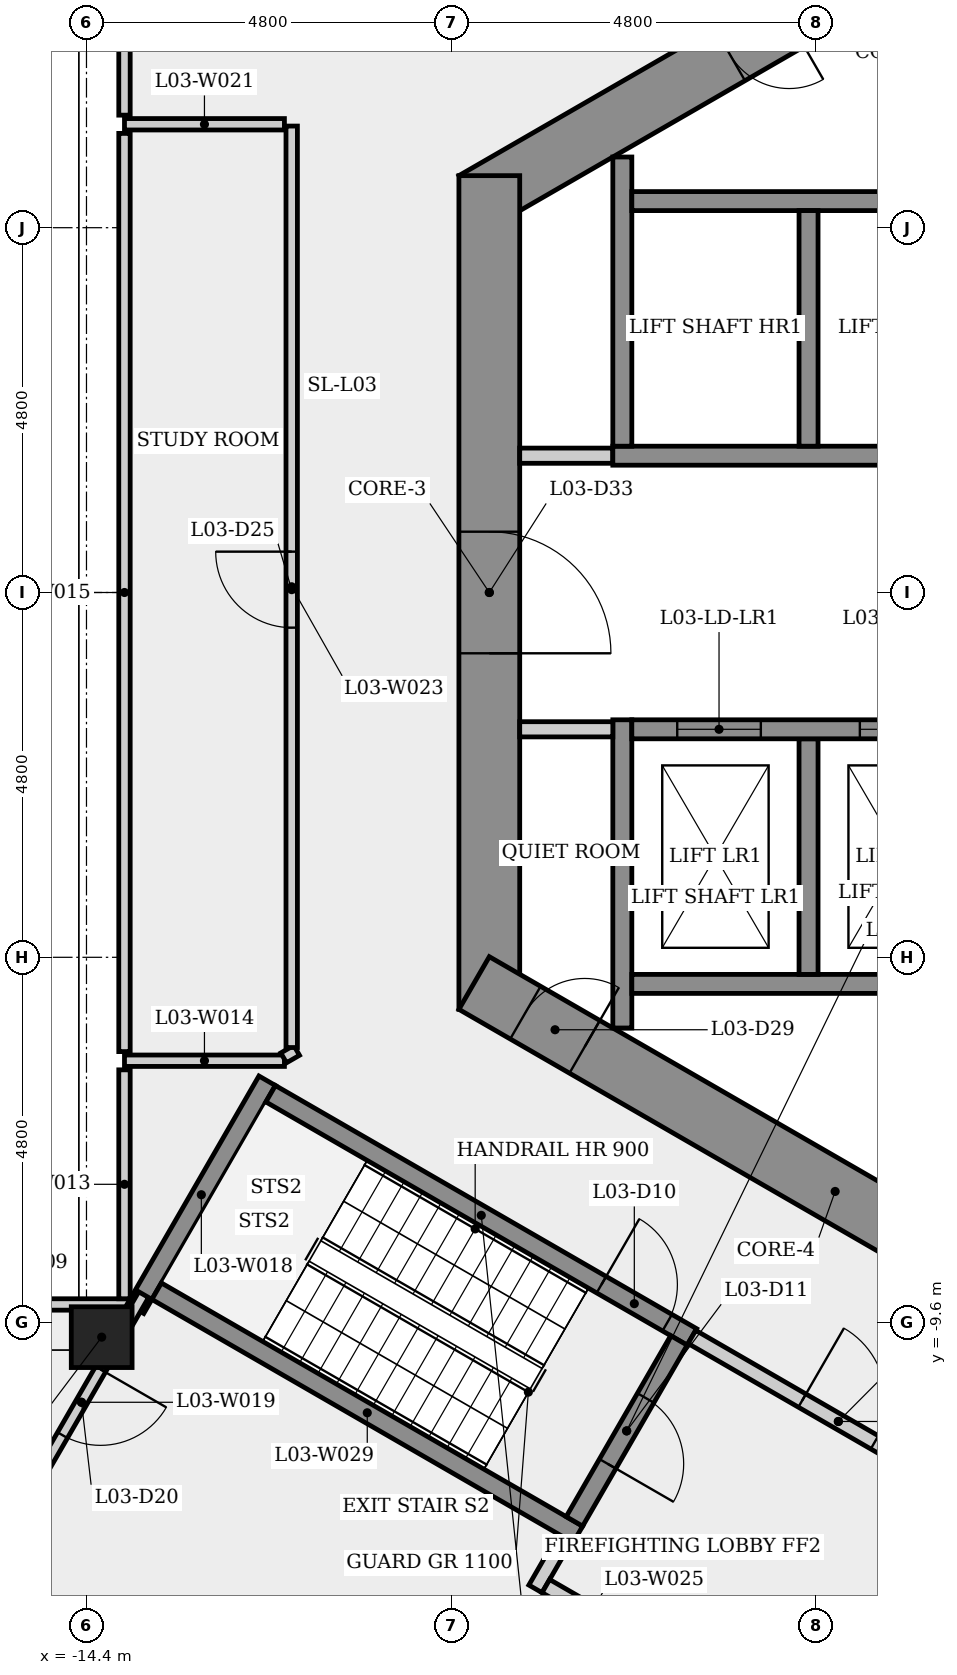
"""IFC4 building model, lengths in metres.
Left out: names, types, materials, properties, quantities, classifications, styles, units other than length and angle.
Written with IfcOpenShell. Run it as: python <this file> out.ifc"""

import sys

from ifc_helpers import new_model, si_unit, direction, frame, frame_2d, origin, origin_2d, place, context, subcontext, project, spatial, rectangle, extrude, element, fill, save


model = new_model("IFC4")
c1 = context("Model", 3, precision=1e-05, world=origin(), true_north=direction((0.0, 1.0)))
c2 = subcontext(c1, "Body", "Model", "MODEL_VIEW")
j1 = project(units=[si_unit("LENGTHUNIT", "METRE"), si_unit("PLANEANGLEUNIT", "RADIAN")], contexts=[c1])
p1 = place(None, origin())
s1 = spatial("IfcSite", under=j1, at=p1, CompositionType="ELEMENT")
p2 = place(p1, origin())
s2 = spatial("IfcBuilding", under=s1, at=p2, CompositionType="ELEMENT")
p3 = place(p2, frame((0.0, 0.0, 16.0)))
s3 = spatial("IfcBuildingStorey", under=s2, at=p3, CompositionType="ELEMENT", Elevation=16.0)
p4 = place(p3, frame((0.2, 10.623, 0.0), z_axis=(0.0, 0.0, 1.0), x_axis=(-0.866023993627, -0.500002442456, 0.0)))
e1 = element("IfcWall", 1, at=p4, inside=s3, PredefinedType="SHEAR", context=c2, shape_type="SweptSolid", body=[
    extrude(rectangle(XDim=10.97, YDim=0.8, at=frame_2d((5.485, 0.0))), origin(), (0.0, 0.0, 1.0), 4.5),
])
p5 = place(p4, frame((6.185, 0.0, 0.0)))
e2 = element("IfcOpeningElement", 2, at=p5, cuts=e1, PredefinedType="OPENING", context=c2, shape_type="SweptSolid", body=[
    extrude(rectangle(XDim=0.9, YDim=2.1, at=frame_2d((0.45, 1.05))), frame((0.0, 0.41, 0.0), z_axis=(0.0, -1.0, 0.0), x_axis=(1.0, 0.0, 0.0)), (0.0, 0.0, 1.0), 0.82),
])
p6 = place(p3, frame((-9.1, 5.485, 0.0), z_axis=(0.0, 0.0, 1.0), x_axis=(0.0, -1.0, 0.0)))
e3 = element("IfcWall", 3, at=p6, inside=s3, PredefinedType="SHEAR", context=c2, shape_type="SweptSolid", body=[
    extrude(rectangle(XDim=10.97, YDim=0.8, at=frame_2d((5.485, 0.0))), origin(), (0.0, 0.0, 1.0), 4.5),
])
p7 = place(p6, frame((4.685, 0.0, 0.0)))
e4 = element("IfcOpeningElement", 4, at=p7, cuts=e3, PredefinedType="OPENING", context=c2, shape_type="SweptSolid", body=[
    extrude(rectangle(XDim=1.6, YDim=2.1, at=frame_2d((0.8, 1.05))), frame((0.0, 0.41, 0.0), z_axis=(0.0, -1.0, 0.0), x_axis=(1.0, 0.0, 0.0)), (0.0, 0.0, 1.0), 0.82),
])
p8 = place(p3, frame((-9.3, -5.138, 0.0), z_axis=(0.0, 0.0, 1.0), x_axis=(0.866023993627, -0.500002442456, 0.0)))
e5 = element("IfcWall", 5, at=p8, inside=s3, PredefinedType="SHEAR", context=c2, shape_type="SweptSolid", body=[
    extrude(rectangle(XDim=10.97, YDim=0.8, at=frame_2d((5.485, 0.0))), origin(), (0.0, 0.0, 1.0), 4.5),
])
p9 = place(p8, frame((0.78, 0.0, 0.0)))
e6 = element("IfcOpeningElement", 6, at=p9, cuts=e5, PredefinedType="OPENING", context=c2, shape_type="SweptSolid", body=[
    extrude(rectangle(XDim=0.9, YDim=2.1, at=frame_2d((0.45, 1.05))), frame((0.0, 0.41, 0.0), z_axis=(0.0, -1.0, 0.0), x_axis=(1.0, 0.0, 0.0)), (0.0, 0.0, 1.0), 0.82),
])
p10 = place(p3, frame((-14.2, -9.798, 0.0), z_axis=(0.0, 0.0, 1.0), x_axis=(-1.0, 0.0, 0.0)))
e7 = element("IfcColumn", 7, at=p10, inside=s3, PredefinedType="COLUMN", context=c2, shape_type="SweptSolid", body=[
    extrude(rectangle(XDim=0.8, YDim=0.8, at=origin_2d()), origin(), (0.0, 0.0, 1.0), 4.05),
])
p11 = place(p3, frame((-16.78, -9.368, 0.0), z_axis=(0.0, 0.0, 1.0), x_axis=(1.0, 0.0, 0.0)))
e8 = element("IfcWall", 8, at=p11, inside=s3, PredefinedType="PARTITIONING", context=c2, shape_type="SweptSolid", body=[
    extrude(rectangle(XDim=2.955, YDim=0.15, at=frame_2d((1.478, 0.0))), origin(), (0.0, 0.0, 1.0), 4.05),
])
p12 = place(p3, frame((-13.9, -9.293, 0.0), z_axis=(0.0, 0.0, 1.0), x_axis=(0.0, 1.0, 0.0)))
e9 = element("IfcWall", 9, at=p12, inside=s3, PredefinedType="PARTITIONING", context=c2, shape_type="SweptSolid", body=[
    extrude(rectangle(XDim=3.012, YDim=0.15, at=frame_2d((1.506, 0.0))), origin(), (0.0, 0.0, 1.0), 4.05),
])
p13 = place(p3, frame((-13.9, -6.161, 0.0), z_axis=(0.0, 0.0, 1.0), x_axis=(1.0, 0.0, 0.0)))
e10 = element("IfcWall", 10, at=p13, inside=s3, PredefinedType="PARTITIONING", context=c2, shape_type="SweptSolid", body=[
    extrude(rectangle(XDim=2.104, YDim=0.15, at=frame_2d((1.052, 0.0))), origin(), (0.0, 0.0, 1.0), 4.05),
])
p14 = place(p3, frame((-13.9, -6.041, 0.0), z_axis=(0.0, 0.0, 1.0), x_axis=(0.0, 1.0, 0.0)))
e11 = element("IfcWall", 11, at=p14, inside=s3, PredefinedType="PARTITIONING", context=c2, shape_type="SweptSolid", body=[
    extrude(rectangle(XDim=12.082, YDim=0.15, at=frame_2d((6.041, 0.0))), origin(), (0.0, 0.0, 1.0), 4.05),
])
p15 = place(p3, frame((-13.9, 6.281, 0.0), z_axis=(0.0, 0.0, 1.0), x_axis=(0.0, 1.0, 0.0)))
e12 = element("IfcWall", 12, at=p15, inside=s3, PredefinedType="PARTITIONING", context=c2, shape_type="SweptSolid", body=[
    extrude(rectangle(XDim=3.162, YDim=0.15, at=frame_2d((1.581, 0.0))), origin(), (0.0, 0.0, 1.0), 4.05),
])
p16 = place(p3, frame((-13.755, -9.424, 0.0), z_axis=(0.0, 0.0, 1.0), x_axis=(0.500005140434, 0.866022435933, 0.0)))
e13 = element("IfcWall", 13, at=p16, inside=s3, PredefinedType="SHEAR", context=c2, shape_type="SweptSolid", body=[
    extrude(rectangle(XDim=3.464, YDim=0.25, at=frame_2d((1.732, 0.0))), origin(), (0.0, 0.0, 1.0), 4.05),
])
p17 = place(p3, frame((-13.648, -9.239, 0.0), z_axis=(0.0, 0.0, 1.0), x_axis=(-0.50004125829, -0.866001581989, 0.0)))
e14 = element("IfcWall", 14, at=p17, inside=s3, PredefinedType="PARTITIONING", context=c2, shape_type="SweptSolid", body=[
    extrude(rectangle(XDim=3.27, YDim=0.15, at=frame_2d((1.635, 0.0))), origin(), (0.0, 0.0, 1.0), 4.05),
])
p18 = place(p17, frame((1.135, 0.0, 0.0)))
e15 = element("IfcOpeningElement", 15, at=p18, cuts=e14, PredefinedType="OPENING", context=c2, shape_type="SweptSolid", body=[
    extrude(rectangle(XDim=1.0, YDim=2.1, at=frame_2d((0.5, 1.05))), frame((0.0, 0.085, 0.0), z_axis=(0.0, -1.0, 0.0), x_axis=(1.0, 0.0, 0.0)), (0.0, 0.0, 1.0), 0.17),
])
p19 = place(p3, frame((-11.977, -6.595, 0.0), z_axis=(0.0, 0.0, 1.0), x_axis=(0.866025499775, -0.499999833739, 0.0)))
e16 = element("IfcWall", 16, at=p19, inside=s3, PredefinedType="SHEAR", context=c2, shape_type="SweptSolid", body=[
    extrude(rectangle(XDim=6.4, YDim=0.25, at=frame_2d((3.2, 0.0))), origin(), (0.0, 0.0, 1.0), 4.05),
])
p20 = place(p19, frame((5.025, 0.0, 0.0)))
e17 = element("IfcOpeningElement", 17, at=p20, cuts=e16, PredefinedType="OPENING", context=c2, shape_type="SweptSolid", body=[
    extrude(rectangle(XDim=1.0, YDim=2.1, at=frame_2d((0.5, 1.05))), frame((0.0, 0.135, 0.0), z_axis=(0.0, -1.0, 0.0), x_axis=(1.0, 0.0, 0.0)), (0.0, 0.0, 1.0), 0.27),
])
p21 = place(p3, frame((-11.796, 6.161, 0.0), z_axis=(0.0, 0.0, 1.0), x_axis=(-1.0, 0.0, 0.0)))
e18 = element("IfcWall", 18, at=p21, inside=s3, PredefinedType="PARTITIONING", context=c2, shape_type="SweptSolid", body=[
    extrude(rectangle(XDim=2.104, YDim=0.15, at=frame_2d((1.052, 0.0))), origin(), (0.0, 0.0, 1.0), 4.05),
])
p22 = place(p3, frame((-11.806, -6.123, 0.0), z_axis=(0.0, 0.0, 1.0), x_axis=(0.866103179807, 0.499865263774, 0.0)))
e19 = element("IfcWall", 19, at=p22, inside=s3, PredefinedType="PARTITIONING", context=c2, shape_type="SweptSolid", body=[
    extrude(rectangle(XDim=0.197, YDim=0.15, at=frame_2d((0.099, 0.0))), origin(), (0.0, 0.0, 1.0), 4.05),
])
p23 = place(p3, frame((-11.7, -5.987, 0.0), z_axis=(0.0, 0.0, 1.0), x_axis=(0.0, 1.0, 0.0)))
e20 = element("IfcWall", 20, at=p23, inside=s3, PredefinedType="PARTITIONING", context=c2, shape_type="SweptSolid", body=[
    extrude(rectangle(XDim=12.125, YDim=0.15, at=frame_2d((6.062, 0.0))), origin(), (0.0, 0.0, 1.0), 4.05),
])
p24 = place(p23, frame((5.525, 0.0, 0.0)))
e21 = element("IfcOpeningElement", 21, at=p24, cuts=e20, PredefinedType="OPENING", context=c2, shape_type="SweptSolid", body=[
    extrude(rectangle(XDim=1.0, YDim=2.1, at=frame_2d((0.5, 1.05))), frame((0.0, 0.085, 0.0), z_axis=(0.0, -1.0, 0.0), x_axis=(1.0, 0.0, 0.0)), (0.0, 0.0, 1.0), 0.17),
])
p25 = place(p3, frame((-8.7, 1.8, 0.0), z_axis=(0.0, 0.0, 1.0), x_axis=(1.0, 0.0, 0.0)))
e22 = element("IfcWall", 22, at=p25, inside=s3, PredefinedType="PARTITIONING", context=c2, shape_type="SweptSolid", body=[
    extrude(rectangle(XDim=1.225, YDim=0.2, at=frame_2d((0.613, 0.0))), origin(), (0.0, 0.0, 1.0), 4.05),
])
p26 = place(p3, frame((-8.493, -13.11, 0.0), z_axis=(0.0, 0.0, 1.0), x_axis=(0.500067724834, 0.865986299303, 0.0)))
e23 = element("IfcWall", 23, at=p26, inside=s3, PredefinedType="PARTITIONING", context=c2, shape_type="SweptSolid", body=[
    extrude(rectangle(XDim=0.775, YDim=0.2, at=frame_2d((0.388, 0.0))), origin(), (0.0, 0.0, 1.0), 4.05),
])
p27 = place(p3, frame((-7.935, -12.393, 0.0), z_axis=(0.0, 0.0, 1.0), x_axis=(-0.866025499775, 0.499999833739, 0.0)))
e24 = element("IfcWall", 24, at=p27, inside=s3, PredefinedType="SHEAR", context=c2, shape_type="SweptSolid", body=[
    extrude(rectangle(XDim=6.4, YDim=0.25, at=frame_2d((3.2, 0.0))), origin(), (0.0, 0.0, 1.0), 4.05),
])
p28 = place(p3, frame((-7.836, -13.373, 0.0), z_axis=(0.0, 0.0, 1.0), x_axis=(-0.866232998003, 0.499640263761, 0.0)))
e25 = element("IfcWall", 25, at=p28, inside=s3, PredefinedType="PARTITIONING", context=c2, shape_type="SweptSolid", body=[
    extrude(rectangle(XDim=0.6, YDim=0.2, at=frame_2d((0.3, 0.0))), origin(), (0.0, 0.0, 1.0), 4.05),
])
p29 = place(p3, frame((-7.475, 1.8, 0.0), z_axis=(0.0, 0.0, 1.0), x_axis=(1.0, 0.0, 0.0)))
e26 = element("IfcWall", 26, at=p29, inside=s3, PredefinedType="SHEAR", context=c2, shape_type="SweptSolid", body=[
    extrude(rectangle(XDim=14.95, YDim=0.25, at=frame_2d((7.475, 0.0))), origin(), (0.0, 0.0, 1.0), 4.05),
])
p30 = place(p3, frame((-7.35, -5.73, 0.0), z_axis=(0.0, 0.0, 1.0), x_axis=(0.0, 1.0, 0.0)))
e27 = element("IfcWall", 27, at=p30, inside=s3, PredefinedType="SHEAR", context=c2, shape_type="SweptSolid", body=[
    extrude(rectangle(XDim=4.055, YDim=0.25, at=frame_2d((2.028, 0.0))), origin(), (0.0, 0.0, 1.0), 4.05),
])
p31 = place(p3, frame((-7.35, 1.925, 0.0), z_axis=(0.0, 0.0, 1.0), x_axis=(0.0, 1.0, 0.0)))
e28 = element("IfcWall", 28, at=p31, inside=s3, PredefinedType="SHEAR", context=c2, shape_type="SweptSolid", body=[
    extrude(rectangle(XDim=3.805, YDim=0.25, at=frame_2d((1.903, 0.0))), origin(), (0.0, 0.0, 1.0), 4.05),
])
p32 = place(p3, frame((-7.225, 5.15, 0.0), z_axis=(0.0, 0.0, 1.0), x_axis=(1.0, 0.0, 0.0)))
e29 = element("IfcWall", 29, at=p32, inside=s3, PredefinedType="SHEAR", context=c2, shape_type="SweptSolid", body=[
    extrude(rectangle(XDim=14.7, YDim=0.25, at=frame_2d((7.35, 0.0))), origin(), (0.0, 0.0, 1.0), 4.05),
])
p33 = place(p3, frame((-7.475, -1.8, 0.0), z_axis=(0.0, 0.0, 1.0), x_axis=(-1.0, 0.0, 0.0)))
e30 = element("IfcWall", 30, at=p33, inside=s3, PredefinedType="PARTITIONING", context=c2, shape_type="SweptSolid", body=[
    extrude(rectangle(XDim=1.225, YDim=0.2, at=frame_2d((0.613, 0.0))), origin(), (0.0, 0.0, 1.0), 4.05),
])
p34 = place(p3, frame((-6.605, -9.841, 0.0), z_axis=(0.0, 0.0, 1.0), x_axis=(-0.499996545922, -0.866027397988, 0.0)))
e31 = element("IfcWall", 31, at=p34, inside=s3, PredefinedType="SHEAR", context=c2, shape_type="SweptSolid", body=[
    extrude(rectangle(XDim=2.75, YDim=0.25, at=frame_2d((1.375, 0.0))), origin(), (0.0, 0.0, 1.0), 4.05),
])
p35 = place(p34, frame((0.875, 0.0, 0.0)))
e32 = element("IfcOpeningElement", 32, at=p35, cuts=e31, PredefinedType="OPENING", context=c2, shape_type="SweptSolid", body=[
    extrude(rectangle(XDim=1.0, YDim=2.1, at=frame_2d((0.5, 1.05))), frame((0.0, 0.135, 0.0), z_axis=(0.0, -1.0, 0.0), x_axis=(1.0, 0.0, 0.0)), (0.0, 0.0, 1.0), 0.27),
])
p36 = place(p3, frame((-6.435, -9.795, 0.0), z_axis=(0.0, 0.0, 1.0), x_axis=(0.866012907634, -0.500021643343, 0.0)))
e33 = element("IfcWall", 33, at=p36, inside=s3, PredefinedType="PARTITIONING", context=c2, shape_type="SweptSolid", body=[
    extrude(rectangle(XDim=4.45, YDim=0.2, at=frame_2d((2.225, 0.0))), origin(), (0.0, 0.0, 1.0), 4.05),
])
p37 = place(p36, frame((1.675, 0.0, 0.0)))
e34 = element("IfcOpeningElement", 34, at=p37, cuts=e33, PredefinedType="OPENING", context=c2, shape_type="SweptSolid", body=[
    extrude(rectangle(XDim=1.1, YDim=2.1, at=frame_2d((0.55, 1.05))), frame((0.0, 0.11, 0.0), z_axis=(0.0, -1.0, 0.0), x_axis=(1.0, 0.0, 0.0)), (0.0, 0.0, 1.0), 0.22),
])
p38 = place(p3, frame((-7.225, -5.15, 0.0), z_axis=(0.0, 0.0, 1.0), x_axis=(1.0, 0.0, 0.0)))
e35 = element("IfcWall", 35, at=p38, inside=s3, PredefinedType="SHEAR", context=c2, shape_type="SweptSolid", body=[
    extrude(rectangle(XDim=14.7, YDim=0.25, at=frame_2d((7.35, 0.0))), origin(), (0.0, 0.0, 1.0), 4.05),
])
for number, where, z_axis, x_axis in (
    (36, (-4.9, -1.925, 0.0), (0.0, 0.0, 1.0), (0.0, -1.0, 0.0)),
    (37, (-4.9, 5.025, 0.0), (0.0, 0.0, 1.0), (0.0, -1.0, 0.0)),
):
    element("IfcWall", number, at=place(p3, frame(where, z_axis=z_axis, x_axis=x_axis)), inside=s3, PredefinedType="SHEAR", context=c2, shape_type="SweptSolid", body=[
        extrude(rectangle(XDim=3.1, YDim=0.25, at=frame_2d((1.55, 0.0))), origin(), (0.0, 0.0, 1.0), 4.5),
    ])
p39 = place(p3, frame((-7.225, -1.8, 0.0), z_axis=(0.0, 0.0, 1.0), x_axis=(1.0, 0.0, 0.0)))
e38 = element("IfcWall", 38, at=p39, inside=s3, PredefinedType="SHEAR", context=c2, shape_type="SweptSolid", body=[
    extrude(rectangle(XDim=14.7, YDim=0.25, at=frame_2d((7.35, 0.0))), origin(), (0.0, 0.0, 1.0), 4.05),
])
p40 = place(p39, frame((0.597, 0.0, 0.0)))
e39 = element("IfcOpeningElement", 39, at=p40, cuts=e38, PredefinedType="OPENING", context=c2, shape_type="SweptSolid", body=[
    extrude(rectangle(XDim=1.1, YDim=2.1, at=frame_2d((0.55, 1.05))), frame((0.0, 0.135, 0.0), z_axis=(0.0, -1.0, 0.0), x_axis=(1.0, 0.0, 0.0)), (0.0, 0.0, 1.0), 0.27),
])
p41 = place(p39, frame((3.0, 0.0, 0.0)))
e40 = element("IfcOpeningElement", 40, at=p41, cuts=e38, PredefinedType="OPENING", context=c2, shape_type="SweptSolid", body=[
    extrude(rectangle(XDim=1.1, YDim=2.1, at=frame_2d((0.55, 1.05))), frame((0.0, 0.135, 0.0), z_axis=(0.0, -1.0, 0.0), x_axis=(1.0, 0.0, 0.0)), (0.0, 0.0, 1.0), 0.27),
])
p42 = place(p39, frame((5.45, 0.0, 0.0)))
e41 = element("IfcOpeningElement", 41, at=p42, cuts=e38, PredefinedType="OPENING", context=c2, shape_type="SweptSolid", body=[
    extrude(rectangle(XDim=1.1, YDim=2.1, at=frame_2d((0.55, 1.05))), frame((0.0, 0.135, 0.0), z_axis=(0.0, -1.0, 0.0), x_axis=(1.0, 0.0, 0.0)), (0.0, 0.0, 1.0), 0.27),
])
p43 = place(p39, frame((7.9, 0.0, 0.0)))
e42 = element("IfcOpeningElement", 42, at=p43, cuts=e38, PredefinedType="OPENING", context=c2, shape_type="SweptSolid", body=[
    extrude(rectangle(XDim=1.1, YDim=2.1, at=frame_2d((0.55, 1.05))), frame((0.0, 0.135, 0.0), z_axis=(0.0, -1.0, 0.0), x_axis=(1.0, 0.0, 0.0)), (0.0, 0.0, 1.0), 0.27),
])
p44 = place(p39, frame((10.35, 0.0, 0.0)))
e43 = element("IfcOpeningElement", 43, at=p44, cuts=e38, PredefinedType="OPENING", context=c2, shape_type="SweptSolid", body=[
    extrude(rectangle(XDim=1.1, YDim=2.1, at=frame_2d((0.55, 1.05))), frame((0.0, 0.135, 0.0), z_axis=(0.0, -1.0, 0.0), x_axis=(1.0, 0.0, 0.0)), (0.0, 0.0, 1.0), 0.27),
])
p45 = place(p40, origin())
e44 = element("IfcDoor", 44, at=p45, inside=s3, OperationType="SLIDING_TO_LEFT", PredefinedType="DOOR", context=c2, shape_type="SweptSolid", body=[
    extrude(rectangle(XDim=1.1, YDim=2.1, at=frame_2d((0.55, 1.05))), frame((0.0, 0.025, 0.0), z_axis=(0.0, -1.0, 0.0), x_axis=(1.0, 0.0, 0.0)), (0.0, 0.0, 1.0), 0.05),
])
fill(e39, e44)
p46 = place(p41, origin())
e45 = element("IfcDoor", 45, at=p46, inside=s3, OperationType="SLIDING_TO_LEFT", PredefinedType="DOOR", context=c2, shape_type="SweptSolid", body=[
    extrude(rectangle(XDim=1.1, YDim=2.1, at=frame_2d((0.55, 1.05))), frame((0.0, 0.025, 0.0), z_axis=(0.0, -1.0, 0.0), x_axis=(1.0, 0.0, 0.0)), (0.0, 0.0, 1.0), 0.05),
])
fill(e40, e45)
p47 = place(p20, origin())
e46 = element("IfcDoor", 46, at=p47, inside=s3, OperationType="SINGLE_SWING_LEFT", PredefinedType="DOOR", context=c2, shape_type="SweptSolid", body=[
    extrude(rectangle(XDim=1.0, YDim=2.1, at=frame_2d((0.5, 1.05))), frame((0.0, 0.025, 0.0), z_axis=(0.0, -1.0, 0.0), x_axis=(1.0, 0.0, 0.0)), (0.0, 0.0, 1.0), 0.05),
])
fill(e17, e46)
p48 = place(p35, origin())
e47 = element("IfcDoor", 47, at=p48, inside=s3, OperationType="SINGLE_SWING_RIGHT", PredefinedType="DOOR", context=c2, shape_type="SweptSolid", body=[
    extrude(rectangle(XDim=1.0, YDim=2.1, at=frame_2d((0.5, 1.05))), frame((0.0, 0.025, 0.0), z_axis=(0.0, -1.0, 0.0), x_axis=(1.0, 0.0, 0.0)), (0.0, 0.0, 1.0), 0.05),
])
fill(e32, e47)
p49 = place(p37, origin())
e48 = element("IfcDoor", 48, at=p49, inside=s3, OperationType="SINGLE_SWING_LEFT", PredefinedType="DOOR", context=c2, shape_type="SweptSolid", body=[
    extrude(rectangle(XDim=1.1, YDim=2.1, at=frame_2d((0.55, 1.05))), frame((0.0, 0.025, 0.0), z_axis=(0.0, -1.0, 0.0), x_axis=(1.0, 0.0, 0.0)), (0.0, 0.0, 1.0), 0.05),
])
fill(e34, e48)
p50 = place(p18, origin())
e49 = element("IfcDoor", 49, at=p50, inside=s3, OperationType="SINGLE_SWING_LEFT", PredefinedType="DOOR", context=c2, shape_type="SweptSolid", body=[
    extrude(rectangle(XDim=1.0, YDim=2.1, at=frame_2d((0.5, 1.05))), frame((0.0, 0.025, 0.0), z_axis=(0.0, -1.0, 0.0), x_axis=(1.0, 0.0, 0.0)), (0.0, 0.0, 1.0), 0.05),
])
fill(e15, e49)
p51 = place(p24, origin())
e50 = element("IfcDoor", 50, at=p51, inside=s3, OperationType="SINGLE_SWING_RIGHT", PredefinedType="DOOR", context=c2, shape_type="SweptSolid", body=[
    extrude(rectangle(XDim=1.0, YDim=2.1, at=frame_2d((0.5, 1.05))), frame((0.0, 0.025, 0.0), z_axis=(0.0, -1.0, 0.0), x_axis=(1.0, 0.0, 0.0)), (0.0, 0.0, 1.0), 0.05),
])
fill(e21, e50)
p52 = place(p5, origin())
e51 = element("IfcDoor", 51, at=p52, inside=s3, OperationType="SINGLE_SWING_LEFT", PredefinedType="DOOR", context=c2, shape_type="SweptSolid", body=[
    extrude(rectangle(XDim=0.9, YDim=2.1, at=frame_2d((0.45, 1.05))), frame((0.0, 0.025, 0.0), z_axis=(0.0, -1.0, 0.0), x_axis=(1.0, 0.0, 0.0)), (0.0, 0.0, 1.0), 0.05),
])
fill(e2, e51)
p53 = place(p9, origin())
e52 = element("IfcDoor", 52, at=p53, inside=s3, OperationType="SINGLE_SWING_RIGHT", PredefinedType="DOOR", context=c2, shape_type="SweptSolid", body=[
    extrude(rectangle(XDim=0.9, YDim=2.1, at=frame_2d((0.45, 1.05))), frame((0.0, 0.025, 0.0), z_axis=(0.0, -1.0, 0.0), x_axis=(1.0, 0.0, 0.0)), (0.0, 0.0, 1.0), 0.05),
])
fill(e6, e52)
p54 = place(p7, origin())
e53 = element("IfcDoor", 53, at=p54, inside=s3, OperationType="SINGLE_SWING_RIGHT", PredefinedType="DOOR", context=c2, shape_type="SweptSolid", body=[
    extrude(rectangle(XDim=1.6, YDim=2.1, at=frame_2d((0.8, 1.05))), frame((0.0, 0.025, 0.0), z_axis=(0.0, -1.0, 0.0), x_axis=(1.0, 0.0, 0.0)), (0.0, 0.0, 1.0), 0.05),
])
fill(e4, e53)
save(model, sys.argv[1])
